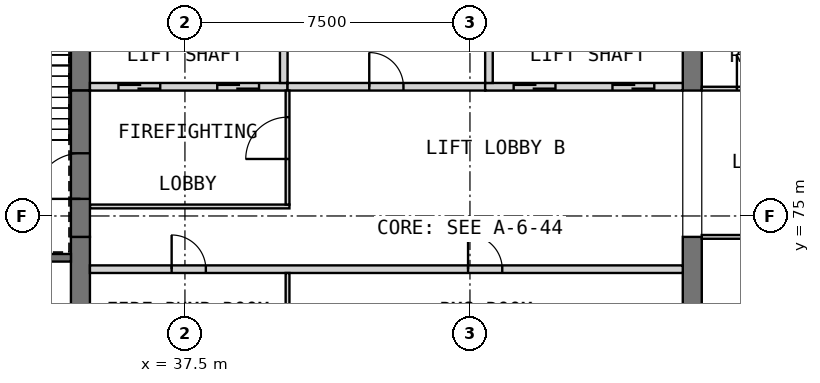
"""IFC4 building model, lengths in metres.
Left out: names, types, materials, properties, quantities, classifications, styles, units other than length and angle.
Written with IfcOpenShell. Run it as: python <this file> out.ifc"""

import sys

from ifc_helpers import new_model, si_unit, direction, frame, frame_2d, origin, place, context, subcontext, project, spatial, rectangle, extrude, element, fill, save


model = new_model("IFC4")
c1 = context("Model", 3, precision=1e-05, world=origin(), true_north=direction((0.0, 1.0)))
c2 = subcontext(c1, "Body", "Model", "MODEL_VIEW")
j1 = project(units=[si_unit("LENGTHUNIT", "METRE"), si_unit("PLANEANGLEUNIT", "RADIAN")], contexts=[c1])
p1 = place(None, origin())
s1 = spatial("IfcSite", under=j1, at=p1, CompositionType="ELEMENT")
p2 = place(p1, origin())
s2 = spatial("IfcBuilding", under=s1, at=p2, CompositionType="ELEMENT")
p3 = place(p2, frame((0.0, 0.0, 314.7)))
s3 = spatial("IfcBuildingStorey", under=s2, at=p3, CompositionType="ELEMENT", Elevation=314.7)
p4 = place(p3, frame((34.75, 68.05, 0.0), z_axis=(0.0, 0.0, 1.0), x_axis=(0.0, 1.0, 0.0)))
e1 = element("IfcWall", 1, at=p4, inside=s3, PredefinedType="SHEAR", context=c2, shape_type="SweptSolid", body=[
    extrude(rectangle(XDim=6.4, YDim=0.5, at=frame_2d((3.2, 0.0))), origin(), (0.0, 0.0, 1.0), 5.5),
])
p5 = place(p3, frame((34.75, 78.3, 0.0), z_axis=(0.0, 0.0, 1.0), x_axis=(0.0, 1.0, 0.0)))
e2 = element("IfcWall", 2, at=p5, inside=s3, PredefinedType="SHEAR", context=c2, shape_type="SweptSolid", body=[
    extrude(rectangle(XDim=3.6, YDim=0.5, at=frame_2d((1.8, 0.0))), origin(), (0.0, 0.0, 1.0), 5.5),
])
p6 = place(p3, frame((50.85, 68.05, 0.0), z_axis=(0.0, 0.0, 1.0), x_axis=(0.0, 1.0, 0.0)))
e3 = element("IfcWall", 3, at=p6, inside=s3, PredefinedType="SHEAR", context=c2, shape_type="SweptSolid", body=[
    extrude(rectangle(XDim=6.4, YDim=0.5, at=frame_2d((3.2, 0.0))), origin(), (0.0, 0.0, 1.0), 5.5),
])
p7 = place(p3, frame((50.85, 78.3, 0.0), z_axis=(0.0, 0.0, 1.0), x_axis=(0.0, 1.0, 0.0)))
e4 = element("IfcWall", 4, at=p7, inside=s3, PredefinedType="SHEAR", context=c2, shape_type="SweptSolid", body=[
    extrude(rectangle(XDim=3.6, YDim=0.5, at=frame_2d((1.8, 0.0))), origin(), (0.0, 0.0, 1.0), 5.5),
])
p8 = place(p3, frame((35.0, 73.6, 0.0), z_axis=(0.0, 0.0, 1.0), x_axis=(1.0, 0.0, 0.0)))
e5 = element("IfcWall", 5, at=p8, inside=s3, PredefinedType="PARTITIONING", context=c2, shape_type="SweptSolid", body=[
    extrude(rectangle(XDim=15.6, YDim=0.2, at=frame_2d((7.8, 0.0))), origin(), (0.0, 0.0, 1.0), 5.09),
])
p9 = place(p8, frame((2.15, 0.0, 0.0)))
e6 = element("IfcOpeningElement", 6, at=p9, cuts=e5, PredefinedType="OPENING", context=c2, shape_type="SweptSolid", body=[
    extrude(rectangle(XDim=0.9, YDim=2.1, at=frame_2d((0.45, 1.05))), frame((0.0, 0.11, 0.0), z_axis=(0.0, -1.0, 0.0), x_axis=(1.0, 0.0, 0.0)), (0.0, 0.0, 1.0), 0.22),
])
p10 = place(p8, frame((9.95, 0.0, 0.0)))
e7 = element("IfcOpeningElement", 7, at=p10, cuts=e5, PredefinedType="OPENING", context=c2, shape_type="SweptSolid", body=[
    extrude(rectangle(XDim=0.9, YDim=2.1, at=frame_2d((0.45, 1.05))), frame((0.0, 0.11, 0.0), z_axis=(0.0, -1.0, 0.0), x_axis=(1.0, 0.0, 0.0)), (0.0, 0.0, 1.0), 0.22),
])
p11 = place(p3, frame((40.2, 71.5, 0.0), z_axis=(0.0, 0.0, 1.0), x_axis=(0.0, 1.0, 0.0)))
e8 = element("IfcWall", 8, at=p11, inside=s3, PredefinedType="PARTITIONING", context=c2, shape_type="SweptSolid", body=[
    extrude(rectangle(XDim=2.0, YDim=0.1, at=frame_2d((1.0, 0.0))), origin(), (0.0, 0.0, 1.0), 5.09),
])
p12 = place(p3, frame((35.0, 78.4, 0.0), z_axis=(0.0, 0.0, 1.0), x_axis=(1.0, 0.0, 0.0)))
e9 = element("IfcWall", 9, at=p12, inside=s3, PredefinedType="SOLIDWALL", context=c2, shape_type="SweptSolid", body=[
    extrude(rectangle(XDim=5.2, YDim=0.2, at=frame_2d((2.6, 0.0))), origin(), (0.0, 0.0, 1.0), 5.5),
])
p13 = place(p12, frame((0.75, 0.0, 0.0)))
e10 = element("IfcOpeningElement", 10, at=p13, cuts=e9, PredefinedType="OPENING", context=c2, shape_type="SweptSolid", body=[
    extrude(rectangle(XDim=1.1, YDim=2.1, at=frame_2d((0.55, 1.05))), frame((0.0, 0.11, 0.0), z_axis=(0.0, -1.0, 0.0), x_axis=(1.0, 0.0, 0.0)), (0.0, 0.0, 1.0), 0.22),
])
p14 = place(p12, frame((3.35, 0.0, 0.0)))
e11 = element("IfcOpeningElement", 11, at=p14, cuts=e9, PredefinedType="OPENING", context=c2, shape_type="SweptSolid", body=[
    extrude(rectangle(XDim=1.1, YDim=2.1, at=frame_2d((0.55, 1.05))), frame((0.0, 0.11, 0.0), z_axis=(0.0, -1.0, 0.0), x_axis=(1.0, 0.0, 0.0)), (0.0, 0.0, 1.0), 0.22),
])
p15 = place(p3, frame((40.1, 78.5, 0.0), z_axis=(0.0, 0.0, 1.0), x_axis=(0.0, 1.0, 0.0)))
e12 = element("IfcWall", 12, at=p15, inside=s3, PredefinedType="SOLIDWALL", context=c2, shape_type="SweptSolid", body=[
    extrude(rectangle(XDim=3.4, YDim=0.2, at=frame_2d((1.7, 0.0))), origin(), (0.0, 0.0, 1.0), 5.5),
])
p16 = place(p3, frame((40.2, 78.4, 0.0), z_axis=(0.0, 0.0, 1.0), x_axis=(1.0, 0.0, 0.0)))
e13 = element("IfcWall", 13, at=p16, inside=s3, PredefinedType="PARTITIONING", context=c2, shape_type="SweptSolid", body=[
    extrude(rectangle(XDim=5.2, YDim=0.2, at=frame_2d((2.6, 0.0))), origin(), (0.0, 0.0, 1.0), 5.09),
])
p17 = place(p16, frame((2.15, 0.0, 0.0)))
e14 = element("IfcOpeningElement", 14, at=p17, cuts=e13, PredefinedType="OPENING", context=c2, shape_type="SweptSolid", body=[
    extrude(rectangle(XDim=0.9, YDim=2.1, at=frame_2d((0.45, 1.05))), frame((0.0, 0.11, 0.0), z_axis=(0.0, -1.0, 0.0), x_axis=(1.0, 0.0, 0.0)), (0.0, 0.0, 1.0), 0.22),
])
p18 = place(p3, frame((45.4, 78.4, 0.0), z_axis=(0.0, 0.0, 1.0), x_axis=(1.0, 0.0, 0.0)))
e15 = element("IfcWall", 15, at=p18, inside=s3, PredefinedType="SOLIDWALL", context=c2, shape_type="SweptSolid", body=[
    extrude(rectangle(XDim=5.2, YDim=0.2, at=frame_2d((2.6, 0.0))), origin(), (0.0, 0.0, 1.0), 5.5),
])
p19 = place(p18, frame((0.75, 0.0, 0.0)))
e16 = element("IfcOpeningElement", 16, at=p19, cuts=e15, PredefinedType="OPENING", context=c2, shape_type="SweptSolid", body=[
    extrude(rectangle(XDim=1.1, YDim=2.1, at=frame_2d((0.55, 1.05))), frame((0.0, 0.11, 0.0), z_axis=(0.0, -1.0, 0.0), x_axis=(1.0, 0.0, 0.0)), (0.0, 0.0, 1.0), 0.22),
])
p20 = place(p18, frame((3.35, 0.0, 0.0)))
e17 = element("IfcOpeningElement", 17, at=p20, cuts=e15, PredefinedType="OPENING", context=c2, shape_type="SweptSolid", body=[
    extrude(rectangle(XDim=1.1, YDim=2.1, at=frame_2d((0.55, 1.05))), frame((0.0, 0.11, 0.0), z_axis=(0.0, -1.0, 0.0), x_axis=(1.0, 0.0, 0.0)), (0.0, 0.0, 1.0), 0.22),
])
p21 = place(p3, frame((45.5, 78.5, 0.0), z_axis=(0.0, 0.0, 1.0), x_axis=(0.0, 1.0, 0.0)))
e18 = element("IfcWall", 18, at=p21, inside=s3, PredefinedType="SOLIDWALL", context=c2, shape_type="SweptSolid", body=[
    extrude(rectangle(XDim=3.4, YDim=0.2, at=frame_2d((1.7, 0.0))), origin(), (0.0, 0.0, 1.0), 5.5),
])
p22 = place(p3, frame((35.0, 75.25, 0.0), z_axis=(0.0, 0.0, 1.0), x_axis=(1.0, 0.0, 0.0)))
e19 = element("IfcWall", 19, at=p22, inside=s3, PredefinedType="PARTITIONING", context=c2, shape_type="SweptSolid", body=[
    extrude(rectangle(XDim=5.25, YDim=0.1, at=frame_2d((2.625, 0.0))), origin(), (0.0, 0.0, 1.0), 5.09),
])
p23 = place(p3, frame((40.2, 75.3, 0.0), z_axis=(0.0, 0.0, 1.0), x_axis=(0.0, 1.0, 0.0)))
e20 = element("IfcWall", 20, at=p23, inside=s3, PredefinedType="PARTITIONING", context=c2, shape_type="SweptSolid", body=[
    extrude(rectangle(XDim=3.0, YDim=0.1, at=frame_2d((1.5, 0.0))), origin(), (0.0, 0.0, 1.0), 5.09),
])
p24 = place(p23, frame((1.2, 0.0, 0.0)))
e21 = element("IfcOpeningElement", 21, at=p24, cuts=e20, PredefinedType="OPENING", context=c2, shape_type="SweptSolid", body=[
    extrude(rectangle(XDim=1.1, YDim=2.1, at=frame_2d((0.55, 1.05))), frame((0.0, 0.06, 0.0), z_axis=(0.0, -1.0, 0.0), x_axis=(1.0, 0.0, 0.0)), (0.0, 0.0, 1.0), 0.12),
])
p25 = place(p3, frame((34.75, 74.45, 0.0), z_axis=(0.0, 0.0, 1.0), x_axis=(0.0, 1.0, 0.0)))
e22 = element("IfcWall", 22, at=p25, inside=s3, PredefinedType="SOLIDWALL", context=c2, shape_type="SweptSolid", body=[
    extrude(rectangle(XDim=3.85, YDim=0.5, at=frame_2d((1.925, 0.0))), origin(), (0.0, 0.0, 1.0), 4.3),
])
p26 = place(p25, frame((1.0, 0.0, 0.0)))
e23 = element("IfcOpeningElement", 23, at=p26, cuts=e22, PredefinedType="OPENING", context=c2, shape_type="SweptSolid", body=[
    extrude(rectangle(XDim=1.2, YDim=2.1, at=frame_2d((0.6, 1.05))), frame((0.0, 0.26, 0.0), z_axis=(0.0, -1.0, 0.0), x_axis=(1.0, 0.0, 0.0)), (0.0, 0.0, 1.0), 0.52),
])
p27 = place(p3, frame((30.6, 73.9, 0.0), z_axis=(0.0, 0.0, 1.0), x_axis=(1.0, 0.0, 0.0)))
e24 = element("IfcWall", 24, at=p27, inside=s3, PredefinedType="SOLIDWALL", context=c2, shape_type="SweptSolid", body=[
    extrude(rectangle(XDim=3.9, YDim=0.2, at=frame_2d((1.95, 0.0))), origin(), (0.0, 0.0, 1.0), 5.09),
])
p28 = place(p27, frame((1.7, 0.0, 0.0)))
e25 = element("IfcOpeningElement", 25, at=p28, cuts=e24, PredefinedType="OPENING", context=c2, shape_type="SweptSolid", body=[
    extrude(rectangle(XDim=0.9, YDim=2.1, at=frame_2d((0.45, 1.05))), frame((0.0, 0.11, 0.0), z_axis=(0.0, -1.0, 0.0), x_axis=(1.0, 0.0, 0.0)), (0.0, 0.0, 1.0), 0.22),
])
p29 = place(p3, frame((51.1, 74.45, 0.0), z_axis=(0.0, 0.0, 1.0), x_axis=(1.0, 0.0, 0.0)))
e26 = element("IfcWall", 26, at=p29, inside=s3, PredefinedType="PARTITIONING", context=c2, shape_type="SweptSolid", body=[
    extrude(rectangle(XDim=8.3, YDim=0.1, at=frame_2d((4.15, 0.0))), origin(), (0.0, 0.0, 1.0), 5.09),
])
p30 = place(p29, frame((3.7, 0.0, 0.0)))
e27 = element("IfcOpeningElement", 27, at=p30, cuts=e26, PredefinedType="OPENING", context=c2, shape_type="SweptSolid", body=[
    extrude(rectangle(XDim=0.9, YDim=2.1, at=frame_2d((0.45, 1.05))), frame((0.0, 0.06, 0.0), z_axis=(0.0, -1.0, 0.0), x_axis=(1.0, 0.0, 0.0)), (0.0, 0.0, 1.0), 0.12),
])
p31 = place(p3, frame((51.1, 78.35, 0.0), z_axis=(0.0, 0.0, 1.0), x_axis=(1.0, 0.0, 0.0)))
e28 = element("IfcWall", 28, at=p31, inside=s3, PredefinedType="PARTITIONING", context=c2, shape_type="SweptSolid", body=[
    extrude(rectangle(XDim=8.3, YDim=0.1, at=frame_2d((4.15, 0.0))), origin(), (0.0, 0.0, 1.0), 5.09),
])
p32 = place(p31, frame((0.925, 0.0, 0.0)))
e29 = element("IfcOpeningElement", 29, at=p32, cuts=e28, PredefinedType="OPENING", context=c2, shape_type="SweptSolid", body=[
    extrude(rectangle(XDim=0.9, YDim=2.1, at=frame_2d((0.45, 1.05))), frame((0.0, 0.06, 0.0), z_axis=(0.0, -1.0, 0.0), x_axis=(1.0, 0.0, 0.0)), (0.0, 0.0, 1.0), 0.12),
])
p33 = place(p31, frame((5.075, 0.0, 0.0)))
e30 = element("IfcOpeningElement", 30, at=p33, cuts=e28, PredefinedType="OPENING", context=c2, shape_type="SweptSolid", body=[
    extrude(rectangle(XDim=0.9, YDim=2.1, at=frame_2d((0.45, 1.05))), frame((0.0, 0.06, 0.0), z_axis=(0.0, -1.0, 0.0), x_axis=(1.0, 0.0, 0.0)), (0.0, 0.0, 1.0), 0.12),
])
p34 = place(p9, origin())
e31 = element("IfcDoor", 31, at=p34, inside=s3, OperationType="SINGLE_SWING_LEFT", PredefinedType="DOOR", context=c2, shape_type="SweptSolid", body=[
    extrude(rectangle(XDim=0.9, YDim=2.1, at=frame_2d((0.45, 1.05))), frame((0.0, 0.025, 0.0), z_axis=(0.0, -1.0, 0.0), x_axis=(1.0, 0.0, 0.0)), (0.0, 0.0, 1.0), 0.05),
])
fill(e6, e31)
p35 = place(p10, origin())
e32 = element("IfcDoor", 32, at=p35, inside=s3, OperationType="SINGLE_SWING_RIGHT", PredefinedType="DOOR", context=c2, shape_type="SweptSolid", body=[
    extrude(rectangle(XDim=0.9, YDim=2.1, at=frame_2d((0.45, 1.05))), frame((0.0, 0.025, 0.0), z_axis=(0.0, -1.0, 0.0), x_axis=(1.0, 0.0, 0.0)), (0.0, 0.0, 1.0), 0.05),
])
fill(e7, e32)
p36 = place(p13, origin())
e33 = element("IfcDoor", 33, at=p36, inside=s3, OperationType="DOUBLE_DOOR_SLIDING", PredefinedType="DOOR", context=c2, shape_type="SweptSolid", body=[
    extrude(rectangle(XDim=1.1, YDim=2.1, at=frame_2d((0.55, 1.05))), frame((0.0, 0.025, 0.0), z_axis=(0.0, -1.0, 0.0), x_axis=(1.0, 0.0, 0.0)), (0.0, 0.0, 1.0), 0.05),
])
fill(e10, e33)
p37 = place(p14, origin())
e34 = element("IfcDoor", 34, at=p37, inside=s3, OperationType="DOUBLE_DOOR_SLIDING", PredefinedType="DOOR", context=c2, shape_type="SweptSolid", body=[
    extrude(rectangle(XDim=1.1, YDim=2.1, at=frame_2d((0.55, 1.05))), frame((0.0, 0.025, 0.0), z_axis=(0.0, -1.0, 0.0), x_axis=(1.0, 0.0, 0.0)), (0.0, 0.0, 1.0), 0.05),
])
fill(e11, e34)
p38 = place(p17, origin())
e35 = element("IfcDoor", 35, at=p38, inside=s3, OperationType="SINGLE_SWING_LEFT", PredefinedType="DOOR", context=c2, shape_type="SweptSolid", body=[
    extrude(rectangle(XDim=0.9, YDim=2.1, at=frame_2d((0.45, 1.05))), frame((0.0, 0.025, 0.0), z_axis=(0.0, -1.0, 0.0), x_axis=(1.0, 0.0, 0.0)), (0.0, 0.0, 1.0), 0.05),
])
fill(e14, e35)
p39 = place(p19, origin())
e36 = element("IfcDoor", 36, at=p39, inside=s3, OperationType="DOUBLE_DOOR_SLIDING", PredefinedType="DOOR", context=c2, shape_type="SweptSolid", body=[
    extrude(rectangle(XDim=1.1, YDim=2.1, at=frame_2d((0.55, 1.05))), frame((0.0, 0.025, 0.0), z_axis=(0.0, -1.0, 0.0), x_axis=(1.0, 0.0, 0.0)), (0.0, 0.0, 1.0), 0.05),
])
fill(e16, e36)
p40 = place(p20, origin())
e37 = element("IfcDoor", 37, at=p40, inside=s3, OperationType="DOUBLE_DOOR_SLIDING", PredefinedType="DOOR", context=c2, shape_type="SweptSolid", body=[
    extrude(rectangle(XDim=1.1, YDim=2.1, at=frame_2d((0.55, 1.05))), frame((0.0, 0.025, 0.0), z_axis=(0.0, -1.0, 0.0), x_axis=(1.0, 0.0, 0.0)), (0.0, 0.0, 1.0), 0.05),
])
fill(e17, e37)
p41 = place(p24, origin())
e38 = element("IfcDoor", 38, at=p41, inside=s3, OperationType="SINGLE_SWING_LEFT", PredefinedType="DOOR", context=c2, shape_type="SweptSolid", body=[
    extrude(rectangle(XDim=1.1, YDim=2.1, at=frame_2d((0.55, 1.05))), frame((0.0, 0.025, 0.0), z_axis=(0.0, -1.0, 0.0), x_axis=(1.0, 0.0, 0.0)), (0.0, 0.0, 1.0), 0.05),
])
fill(e21, e38)
p42 = place(p26, origin())
e39 = element("IfcDoor", 39, at=p42, inside=s3, OperationType="SINGLE_SWING_RIGHT", PredefinedType="DOOR", context=c2, shape_type="SweptSolid", body=[
    extrude(rectangle(XDim=1.2, YDim=2.1, at=frame_2d((0.6, 1.05))), frame((0.0, 0.025, 0.0), z_axis=(0.0, -1.0, 0.0), x_axis=(1.0, 0.0, 0.0)), (0.0, 0.0, 1.0), 0.05),
])
fill(e23, e39)
p43 = place(p32, origin())
e40 = element("IfcDoor", 40, at=p43, inside=s3, OperationType="SINGLE_SWING_LEFT", PredefinedType="DOOR", context=c2, shape_type="SweptSolid", body=[
    extrude(rectangle(XDim=0.9, YDim=2.1, at=frame_2d((0.45, 1.05))), frame((0.0, 0.025, 0.0), z_axis=(0.0, -1.0, 0.0), x_axis=(1.0, 0.0, 0.0)), (0.0, 0.0, 1.0), 0.05),
])
fill(e29, e40)
save(model, sys.argv[1])
